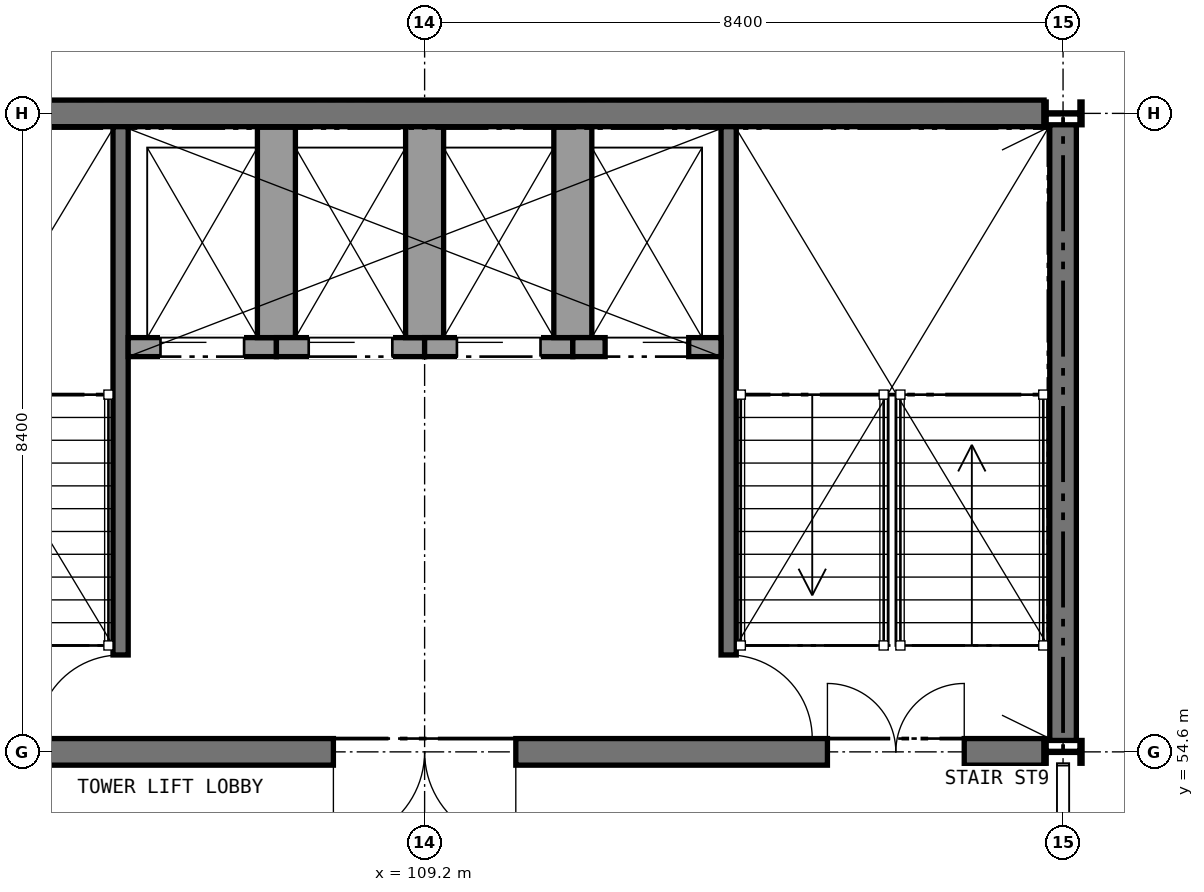
"""IFC4 building model, lengths in metres.
Left out: names, types, materials, properties, quantities, classifications, styles, units other than length and angle.
Written with IfcOpenShell. Run it as: python <this file> out.ifc"""

import sys

from ifc_helpers import new_model, si_unit, direction, frame, frame_2d, origin, origin_2d, place, context, subcontext, project, spatial, rectangle, i_section, extrude, element, fill, save


model = new_model("IFC4")
c1 = context("Model", 3, precision=1e-05, world=origin(), true_north=direction((0.0, 1.0)))
c2 = subcontext(c1, "Body", "Model", "MODEL_VIEW")
j1 = project(units=[si_unit("LENGTHUNIT", "METRE"), si_unit("PLANEANGLEUNIT", "RADIAN")], contexts=[c1])
p1 = place(None, origin())
s1 = spatial("IfcSite", under=j1, at=p1, CompositionType="ELEMENT")
p2 = place(p1, origin())
s2 = spatial("IfcBuilding", under=s1, at=p2, CompositionType="ELEMENT")
p3 = place(p2, frame((0.0, 0.0, 35.6)))
s3 = spatial("IfcBuildingStorey", under=s2, at=p3, CompositionType="ELEMENT", Elevation=35.6)
p4 = place(p3, frame((100.95, 63.0, 0.0), z_axis=(0.0, 0.0, 1.0), x_axis=(1.0, 0.0, 0.0)))
e1 = element("IfcWall", 1, at=p4, inside=s3, PredefinedType="SHEAR", context=c2, shape_type="SweptSolid", body=[
    extrude(rectangle(XDim=16.4, YDim=0.35, at=frame_2d((8.2, 0.0))), origin(), (0.0, 0.0, 1.0), 3.85),
])
p5 = place(p3, frame((100.95, 54.6, 0.0), z_axis=(0.0, 0.0, 1.0), x_axis=(1.0, 0.0, 0.0)))
e2 = element("IfcWall", 2, at=p5, inside=s3, PredefinedType="SHEAR", context=c2, shape_type="SweptSolid", body=[
    extrude(rectangle(XDim=16.4, YDim=0.35, at=frame_2d((8.2, 0.0))), origin(), (0.0, 0.0, 1.0), 3.85),
])
p6 = place(p5, frame((1.15, 0.0, 0.0)))
e3 = element("IfcOpeningElement", 3, at=p6, cuts=e2, PredefinedType="OPENING", context=c2, shape_type="SweptSolid", body=[
    extrude(rectangle(XDim=1.8, YDim=2.1, at=frame_2d((0.9, 1.05))), frame((0.0, 0.185, 0.0), z_axis=(0.0, -1.0, 0.0), x_axis=(1.0, 0.0, 0.0)), (0.0, 0.0, 1.0), 0.37),
])
p7 = place(p5, frame((13.55, 0.0, 0.0)))
e4 = element("IfcOpeningElement", 4, at=p7, cuts=e2, PredefinedType="OPENING", context=c2, shape_type="SweptSolid", body=[
    extrude(rectangle(XDim=1.8, YDim=2.1, at=frame_2d((0.9, 1.05))), frame((0.0, 0.185, 0.0), z_axis=(0.0, -1.0, 0.0), x_axis=(1.0, 0.0, 0.0)), (0.0, 0.0, 1.0), 0.37),
])
p8 = place(p5, frame((7.05, 0.0, 0.0)))
e5 = element("IfcOpeningElement", 5, at=p8, cuts=e2, PredefinedType="OPENING", context=c2, shape_type="SweptSolid", body=[
    extrude(rectangle(XDim=2.4, YDim=2.4, at=frame_2d((1.2, 1.2))), frame((0.0, 0.185, 0.0), z_axis=(0.0, -1.0, 0.0), x_axis=(1.0, 0.0, 0.0)), (0.0, 0.0, 1.0), 0.37),
])
p9 = place(p3, frame((117.6, 54.75, 0.0), z_axis=(0.0, 0.0, 1.0), x_axis=(0.0, 1.0, 0.0)))
e6 = element("IfcWall", 6, at=p9, inside=s3, PredefinedType="SHEAR", context=c2, shape_type="SweptSolid", body=[
    extrude(rectangle(XDim=8.1, YDim=0.35, at=frame_2d((4.05, 0.0))), origin(), (0.0, 0.0, 1.0), 3.85),
])
for number, where, z_axis, x_axis in (
    (7, (117.6, 54.6, 0.0), (0.0, 0.0, 1.0), (0.0, 1.0, 0.0)),
    (8, (117.6, 63.0, 0.0), (0.0, 0.0, 1.0), (0.0, 1.0, 0.0)),
):
    element("IfcColumn", number, at=place(p3, frame(where, z_axis=z_axis, x_axis=x_axis)), inside=s3, PredefinedType="COLUMN", context=c2, shape_type="SweptSolid", body=[
        extrude(i_section(OverallWidth=0.3, OverallDepth=0.5, WebThickness=0.014, FlangeThickness=0.028, FilletRadius=0.027, at=origin_2d()), origin(), (0.0, 0.0, 1.0), 4.0),
    ])
p10 = place(p3, frame((105.2, 62.825, 0.0), z_axis=(0.0, 0.0, 1.0), x_axis=(0.0, -1.0, 0.0)))
e9 = element("IfcWall", 9, at=p10, inside=s3, PredefinedType="SHEAR", context=c2, shape_type="SweptSolid", body=[
    extrude(rectangle(XDim=8.05, YDim=0.2, at=frame_2d((4.025, 0.0))), origin(), (0.0, 0.0, 1.0), 3.85),
])
p11 = place(p10, frame((6.95, 0.0, 0.0)))
e10 = element("IfcOpeningElement", 10, at=p11, cuts=e9, PredefinedType="OPENING", context=c2, shape_type="SweptSolid", body=[
    extrude(rectangle(XDim=1.11, YDim=2.1, at=frame_2d((0.555, 1.05))), frame((0.0, 0.11, 0.0), z_axis=(0.0, -1.0, 0.0), x_axis=(1.0, 0.0, 0.0)), (0.0, 0.0, 1.0), 0.22),
])
p12 = place(p3, frame((113.2, 62.825, 0.0), z_axis=(0.0, 0.0, 1.0), x_axis=(0.0, -1.0, 0.0)))
e11 = element("IfcWall", 11, at=p12, inside=s3, PredefinedType="SHEAR", context=c2, shape_type="SweptSolid", body=[
    extrude(rectangle(XDim=8.05, YDim=0.2, at=frame_2d((4.025, 0.0))), origin(), (0.0, 0.0, 1.0), 3.85),
])
p13 = place(p12, frame((6.95, 0.0, 0.0)))
e12 = element("IfcOpeningElement", 12, at=p13, cuts=e11, PredefinedType="OPENING", context=c2, shape_type="SweptSolid", body=[
    extrude(rectangle(XDim=1.11, YDim=2.1, at=frame_2d((0.555, 1.05))), frame((0.0, 0.11, 0.0), z_axis=(0.0, -1.0, 0.0), x_axis=(1.0, 0.0, 0.0)), (0.0, 0.0, 1.0), 0.22),
])
p14 = place(p3, frame((105.3, 59.925, 0.0), z_axis=(0.0, 0.0, 1.0), x_axis=(1.0, 0.0, 0.0)))
e13 = element("IfcWall", 13, at=p14, inside=s3, PredefinedType="SOLIDWALL", context=c2, shape_type="SweptSolid", body=[
    extrude(rectangle(XDim=1.95, YDim=0.25, at=frame_2d((0.975, 0.0))), origin(), (0.0, 0.0, 1.0), 4.0),
])
p15 = place(p14, frame((0.425, 0.0, 0.0)))
e14 = element("IfcOpeningElement", 14, at=p15, cuts=e13, PredefinedType="OPENING", context=c2, shape_type="SweptSolid", body=[
    extrude(rectangle(XDim=1.1, YDim=2.1, at=frame_2d((0.55, 1.05))), frame((0.0, 0.135, 0.0), z_axis=(0.0, -1.0, 0.0), x_axis=(1.0, 0.0, 0.0)), (0.0, 0.0, 1.0), 0.27),
])
p16 = place(p3, frame((107.25, 62.825, 0.0), z_axis=(0.0, 0.0, 1.0), x_axis=(0.0, -1.0, 0.0)))
e15 = element("IfcWall", 15, at=p16, inside=s3, PredefinedType="SOLIDWALL", context=c2, shape_type="SweptSolid", body=[
    extrude(rectangle(XDim=2.775, YDim=0.5, at=frame_2d((1.387, 0.0))), origin(), (0.0, 0.0, 1.0), 4.0),
])
p17 = place(p3, frame((107.25, 59.925, 0.0), z_axis=(0.0, 0.0, 1.0), x_axis=(1.0, 0.0, 0.0)))
e16 = element("IfcWall", 16, at=p17, inside=s3, PredefinedType="SOLIDWALL", context=c2, shape_type="SweptSolid", body=[
    extrude(rectangle(XDim=1.95, YDim=0.25, at=frame_2d((0.975, 0.0))), origin(), (0.0, 0.0, 1.0), 4.0),
])
p18 = place(p17, frame((0.425, 0.0, 0.0)))
e17 = element("IfcOpeningElement", 17, at=p18, cuts=e16, PredefinedType="OPENING", context=c2, shape_type="SweptSolid", body=[
    extrude(rectangle(XDim=1.1, YDim=2.1, at=frame_2d((0.55, 1.05))), frame((0.0, 0.135, 0.0), z_axis=(0.0, -1.0, 0.0), x_axis=(1.0, 0.0, 0.0)), (0.0, 0.0, 1.0), 0.27),
])
p19 = place(p3, frame((109.2, 62.825, 0.0), z_axis=(0.0, 0.0, 1.0), x_axis=(0.0, -1.0, 0.0)))
e18 = element("IfcWall", 18, at=p19, inside=s3, PredefinedType="SOLIDWALL", context=c2, shape_type="SweptSolid", body=[
    extrude(rectangle(XDim=2.775, YDim=0.5, at=frame_2d((1.387, 0.0))), origin(), (0.0, 0.0, 1.0), 4.0),
])
p20 = place(p3, frame((109.2, 59.925, 0.0), z_axis=(0.0, 0.0, 1.0), x_axis=(1.0, 0.0, 0.0)))
e19 = element("IfcWall", 19, at=p20, inside=s3, PredefinedType="SOLIDWALL", context=c2, shape_type="SweptSolid", body=[
    extrude(rectangle(XDim=1.95, YDim=0.25, at=frame_2d((0.975, 0.0))), origin(), (0.0, 0.0, 1.0), 4.0),
])
p21 = place(p20, frame((0.425, 0.0, 0.0)))
e20 = element("IfcOpeningElement", 20, at=p21, cuts=e19, PredefinedType="OPENING", context=c2, shape_type="SweptSolid", body=[
    extrude(rectangle(XDim=1.1, YDim=2.1, at=frame_2d((0.55, 1.05))), frame((0.0, 0.135, 0.0), z_axis=(0.0, -1.0, 0.0), x_axis=(1.0, 0.0, 0.0)), (0.0, 0.0, 1.0), 0.27),
])
p22 = place(p3, frame((111.15, 62.825, 0.0), z_axis=(0.0, 0.0, 1.0), x_axis=(0.0, -1.0, 0.0)))
e21 = element("IfcWall", 21, at=p22, inside=s3, PredefinedType="SOLIDWALL", context=c2, shape_type="SweptSolid", body=[
    extrude(rectangle(XDim=2.775, YDim=0.5, at=frame_2d((1.387, 0.0))), origin(), (0.0, 0.0, 1.0), 4.0),
])
p23 = place(p3, frame((111.15, 59.925, 0.0), z_axis=(0.0, 0.0, 1.0), x_axis=(1.0, 0.0, 0.0)))
e22 = element("IfcWall", 22, at=p23, inside=s3, PredefinedType="SOLIDWALL", context=c2, shape_type="SweptSolid", body=[
    extrude(rectangle(XDim=1.95, YDim=0.25, at=frame_2d((0.975, 0.0))), origin(), (0.0, 0.0, 1.0), 4.0),
])
p24 = place(p23, frame((0.425, 0.0, 0.0)))
e23 = element("IfcOpeningElement", 23, at=p24, cuts=e22, PredefinedType="OPENING", context=c2, shape_type="SweptSolid", body=[
    extrude(rectangle(XDim=1.1, YDim=2.1, at=frame_2d((0.55, 1.05))), frame((0.0, 0.135, 0.0), z_axis=(0.0, -1.0, 0.0), x_axis=(1.0, 0.0, 0.0)), (0.0, 0.0, 1.0), 0.27),
])
p25 = place(p11, frame((1.1, 0.0, 0.0), z_axis=(0.0, 0.0, 1.0), x_axis=(-1.0, 0.0, 0.0)))
e24 = element("IfcDoor", 24, at=p25, inside=s3, OperationType="SINGLE_SWING_LEFT", PredefinedType="DOOR", context=c2, shape_type="SweptSolid", body=[
    extrude(rectangle(XDim=1.1, YDim=2.1, at=frame_2d((0.55, 1.05))), frame((0.0, 0.025, 0.0), z_axis=(0.0, -1.0, 0.0), x_axis=(1.0, 0.0, 0.0)), (0.0, 0.0, 1.0), 0.05),
])
fill(e10, e24)
p26 = place(p13, origin())
e25 = element("IfcDoor", 25, at=p26, inside=s3, OperationType="SINGLE_SWING_RIGHT", PredefinedType="DOOR", context=c2, shape_type="SweptSolid", body=[
    extrude(rectangle(XDim=1.1, YDim=2.1, at=frame_2d((0.55, 1.05))), frame((0.0, 0.025, 0.0), z_axis=(0.0, -1.0, 0.0), x_axis=(1.0, 0.0, 0.0)), (0.0, 0.0, 1.0), 0.05),
])
fill(e12, e25)
p27 = place(p15, frame((1.1, 0.0, 0.0), z_axis=(0.0, 0.0, 1.0), x_axis=(-1.0, 0.0, 0.0)))
e26 = element("IfcDoor", 26, at=p27, inside=s3, OperationType="SLIDING_TO_RIGHT", PredefinedType="DOOR", context=c2, shape_type="SweptSolid", body=[
    extrude(rectangle(XDim=1.1, YDim=2.1, at=frame_2d((0.55, 1.05))), frame((0.0, 0.025, 0.0), z_axis=(0.0, -1.0, 0.0), x_axis=(1.0, 0.0, 0.0)), (0.0, 0.0, 1.0), 0.05),
])
fill(e14, e26)
p28 = place(p18, frame((1.1, 0.0, 0.0), z_axis=(0.0, 0.0, 1.0), x_axis=(-1.0, 0.0, 0.0)))
e27 = element("IfcDoor", 27, at=p28, inside=s3, OperationType="SLIDING_TO_RIGHT", PredefinedType="DOOR", context=c2, shape_type="SweptSolid", body=[
    extrude(rectangle(XDim=1.1, YDim=2.1, at=frame_2d((0.55, 1.05))), frame((0.0, 0.025, 0.0), z_axis=(0.0, -1.0, 0.0), x_axis=(1.0, 0.0, 0.0)), (0.0, 0.0, 1.0), 0.05),
])
fill(e17, e27)
p29 = place(p21, frame((1.1, 0.0, 0.0), z_axis=(0.0, 0.0, 1.0), x_axis=(-1.0, 0.0, 0.0)))
e28 = element("IfcDoor", 28, at=p29, inside=s3, OperationType="SLIDING_TO_RIGHT", PredefinedType="DOOR", context=c2, shape_type="SweptSolid", body=[
    extrude(rectangle(XDim=1.1, YDim=2.1, at=frame_2d((0.55, 1.05))), frame((0.0, 0.025, 0.0), z_axis=(0.0, -1.0, 0.0), x_axis=(1.0, 0.0, 0.0)), (0.0, 0.0, 1.0), 0.05),
])
fill(e20, e28)
p30 = place(p24, frame((1.1, 0.0, 0.0), z_axis=(0.0, 0.0, 1.0), x_axis=(-1.0, 0.0, 0.0)))
e29 = element("IfcDoor", 29, at=p30, inside=s3, OperationType="SLIDING_TO_LEFT", PredefinedType="DOOR", context=c2, shape_type="SweptSolid", body=[
    extrude(rectangle(XDim=1.1, YDim=2.1, at=frame_2d((0.55, 1.05))), frame((0.0, 0.025, 0.0), z_axis=(0.0, -1.0, 0.0), x_axis=(1.0, 0.0, 0.0)), (0.0, 0.0, 1.0), 0.05),
])
fill(e23, e29)
p31 = place(p7, origin())
e30 = element("IfcDoor", 30, at=p31, inside=s3, OperationType="DOUBLE_DOOR_SINGLE_SWING", PredefinedType="DOOR", context=c2, shape_type="SweptSolid", body=[
    extrude(rectangle(XDim=1.8, YDim=2.1, at=frame_2d((0.9, 1.05))), frame((0.0, 0.025, 0.0), z_axis=(0.0, -1.0, 0.0), x_axis=(1.0, 0.0, 0.0)), (0.0, 0.0, 1.0), 0.05),
])
fill(e4, e30)
p32 = place(p8, frame((2.4, 0.0, 0.0), z_axis=(0.0, 0.0, 1.0), x_axis=(-1.0, 0.0, 0.0)))
e31 = element("IfcDoor", 31, at=p32, inside=s3, OperationType="DOUBLE_DOOR_SINGLE_SWING", PredefinedType="DOOR", context=c2, shape_type="SweptSolid", body=[
    extrude(rectangle(XDim=2.4, YDim=2.4, at=frame_2d((1.2, 1.2))), frame((0.0, 0.025, 0.0), z_axis=(0.0, -1.0, 0.0), x_axis=(1.0, 0.0, 0.0)), (0.0, 0.0, 1.0), 0.05),
])
fill(e5, e31)
save(model, sys.argv[1])
